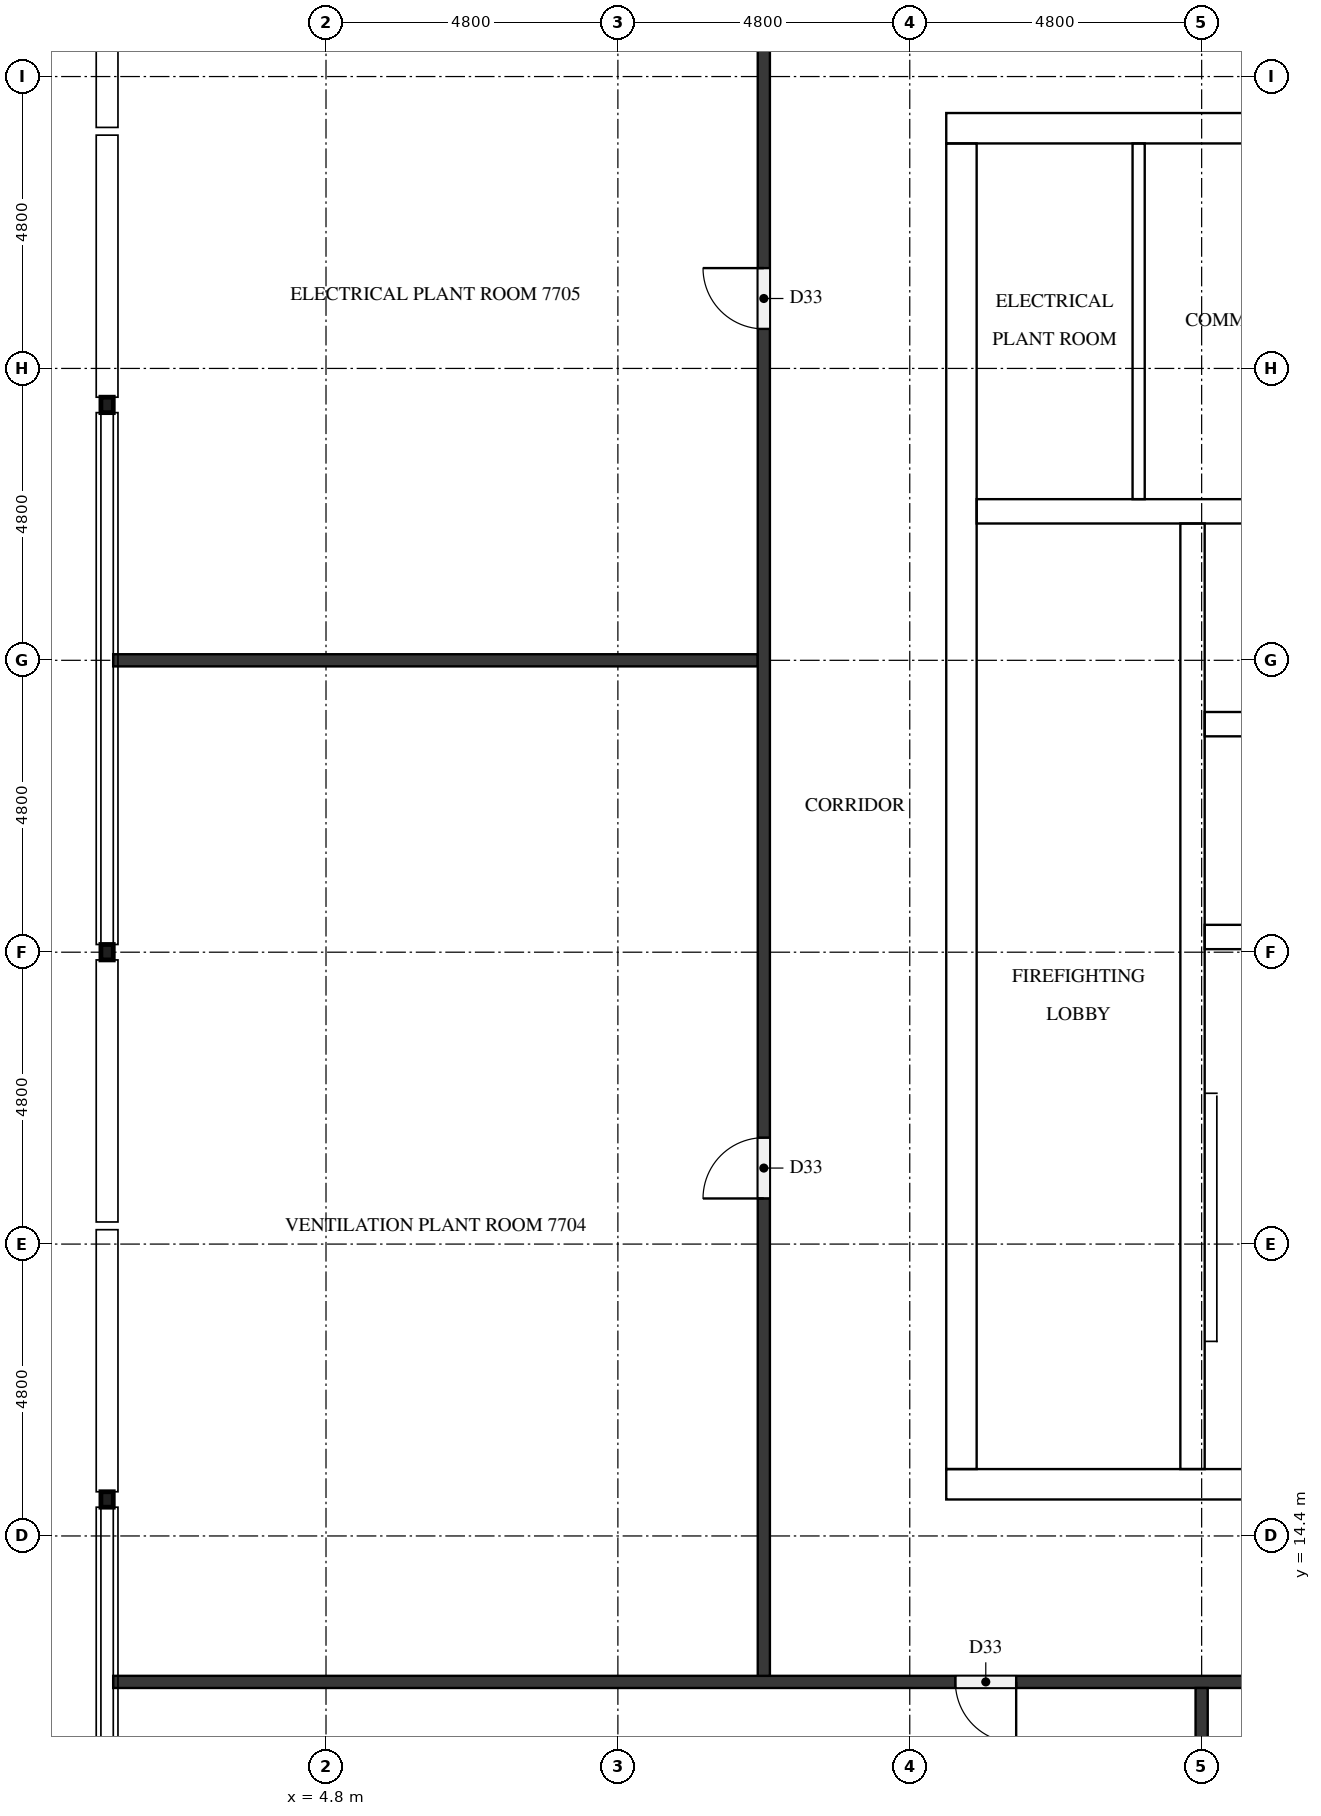
"""IFC4 building model, lengths in metres.
Left out: names, types, materials, properties, quantities, classifications, styles, units other than length and angle.
Written with IfcOpenShell. Run it as: python <this file> out.ifc"""

import sys

from ifc_helpers import new_model, si_unit, direction, frame, frame_2d, origin, origin_2d, place, context, subcontext, project, spatial, rectangle, hollow_rectangle, extrude, element, fill, save


model = new_model("IFC4")
c1 = context("Model", 3, precision=1e-05, world=origin(), true_north=direction((0.0, 1.0)))
c2 = subcontext(c1, "Body", "Model", "MODEL_VIEW")
j1 = project(units=[si_unit("LENGTHUNIT", "METRE"), si_unit("PLANEANGLEUNIT", "RADIAN")], contexts=[c1])
p1 = place(None, origin())
s1 = spatial("IfcSite", under=j1, at=p1, CompositionType="ELEMENT")
p2 = place(p1, origin())
s2 = spatial("IfcBuilding", under=s1, at=p2, CompositionType="ELEMENT")
p3 = place(p2, frame((0.0, 0.0, 296.3)))
s3 = spatial("IfcBuildingStorey", under=s2, at=p3, CompositionType="ELEMENT", Elevation=296.3)
p4 = place(p3, frame((15.0, 15.25, 0.0), z_axis=(0.0, 0.0, 1.0), x_axis=(1.0, 0.0, 0.0)))
e1 = element("IfcWall", 1, at=p4, inside=s3, PredefinedType="SHEAR", context=c2, shape_type="SweptSolid", body=[
    extrude(rectangle(XDim=32.4, YDim=0.5, at=frame_2d((16.2, 0.0))), origin(), (0.0, 0.0, 1.0), 4.4),
])
p5 = place(p4, frame((15.3, 0.0, 0.0)))
e2 = element("IfcOpeningElement", 2, at=p5, cuts=e1, PredefinedType="OPENING", context=c2, shape_type="SweptSolid", body=[
    extrude(rectangle(XDim=1.8, YDim=2.1, at=frame_2d((0.9, 1.05))), frame((0.0, 0.26, 0.0), z_axis=(0.0, -1.0, 0.0), x_axis=(1.0, 0.0, 0.0)), (0.0, 0.0, 1.0), 0.52),
])
p6 = place(p3, frame((15.0, 37.55, 0.0), z_axis=(0.0, 0.0, 1.0), x_axis=(1.0, 0.0, 0.0)))
e3 = element("IfcWall", 3, at=p6, inside=s3, PredefinedType="SHEAR", context=c2, shape_type="SweptSolid", body=[
    extrude(rectangle(XDim=32.4, YDim=0.5, at=frame_2d((16.2, 0.0))), origin(), (0.0, 0.0, 1.0), 4.4),
])
p7 = place(p6, frame((15.3, 0.0, 0.0)))
e4 = element("IfcOpeningElement", 4, at=p7, cuts=e3, PredefinedType="OPENING", context=c2, shape_type="SweptSolid", body=[
    extrude(rectangle(XDim=1.8, YDim=2.1, at=frame_2d((0.9, 1.05))), frame((0.0, 0.26, 0.0), z_axis=(0.0, -1.0, 0.0), x_axis=(1.0, 0.0, 0.0)), (0.0, 0.0, 1.0), 0.52),
])
p8 = place(p6, frame((1.282, 0.0, 0.0)))
e5 = element("IfcOpeningElement", 5, at=p8, cuts=e3, PredefinedType="OPENING", context=c2, shape_type="SweptSolid", body=[
    extrude(rectangle(XDim=1.0, YDim=2.1, at=frame_2d((0.5, 1.05))), frame((0.0, 0.26, 0.0), z_axis=(0.0, -1.0, 0.0), x_axis=(1.0, 0.0, 0.0)), (0.0, 0.0, 1.0), 0.52),
])
p9 = place(p6, frame((5.082, 0.0, 0.0)))
e6 = element("IfcOpeningElement", 6, at=p9, cuts=e3, PredefinedType="OPENING", context=c2, shape_type="SweptSolid", body=[
    extrude(rectangle(XDim=1.0, YDim=2.1, at=frame_2d((0.5, 1.05))), frame((0.0, 0.26, 0.0), z_axis=(0.0, -1.0, 0.0), x_axis=(1.0, 0.0, 0.0)), (0.0, 0.0, 1.0), 0.52),
])
p10 = place(p3, frame((15.25, 15.5, 0.0), z_axis=(0.0, 0.0, 1.0), x_axis=(0.0, 1.0, 0.0)))
e7 = element("IfcWall", 7, at=p10, inside=s3, PredefinedType="SHEAR", context=c2, shape_type="SweptSolid", body=[
    extrude(rectangle(XDim=21.8, YDim=0.5, at=frame_2d((10.9, 0.0))), origin(), (0.0, 0.0, 1.0), 4.4),
])
p11 = place(p10, frame((5.26, 0.0, 0.0)))
e8 = element("IfcOpeningElement", 8, at=p11, cuts=e7, PredefinedType="OPENING", context=c2, shape_type="SweptSolid", body=[
    extrude(rectangle(XDim=1.2, YDim=2.1, at=frame_2d((0.6, 1.05))), frame((0.0, 0.26, 0.0), z_axis=(0.0, -1.0, 0.0), x_axis=(1.0, 0.0, 0.0)), (0.0, 0.0, 1.0), 0.52),
])
p12 = place(p3, frame((19.05, 15.5, 0.0), z_axis=(0.0, 0.0, 1.0), x_axis=(0.0, 1.0, 0.0)))
e9 = element("IfcWall", 9, at=p12, inside=s3, PredefinedType="SHEAR", context=c2, shape_type="SweptSolid", body=[
    extrude(rectangle(XDim=15.55, YDim=0.4, at=frame_2d((7.775, 0.0))), origin(), (0.0, 0.0, 1.0), 4.4),
])
p13 = place(p12, frame((9.95, 0.0, 0.0)))
e10 = element("IfcOpeningElement", 10, at=p13, cuts=e9, PredefinedType="OPENING", context=c2, shape_type="SweptSolid", body=[
    extrude(rectangle(XDim=1.1, YDim=2.1, at=frame_2d((0.55, 1.05))), frame((0.0, 0.21, 0.0), z_axis=(0.0, -1.0, 0.0), x_axis=(1.0, 0.0, 0.0)), (0.0, 0.0, 1.0), 0.42),
])
p14 = place(p12, frame((13.45, 0.0, 0.0)))
e11 = element("IfcOpeningElement", 11, at=p14, cuts=e9, PredefinedType="OPENING", context=c2, shape_type="SweptSolid", body=[
    extrude(rectangle(XDim=1.1, YDim=2.1, at=frame_2d((0.55, 1.05))), frame((0.0, 0.21, 0.0), z_axis=(0.0, -1.0, 0.0), x_axis=(1.0, 0.0, 0.0)), (0.0, 0.0, 1.0), 0.42),
])
p15 = place(p12, frame((0.7, 0.0, 0.0)))
e12 = element("IfcOpeningElement", 12, at=p15, cuts=e9, PredefinedType="OPENING", context=c2, shape_type="SweptSolid", body=[
    extrude(rectangle(XDim=1.2, YDim=2.1, at=frame_2d((0.6, 1.05))), frame((0.0, 0.21, 0.0), z_axis=(0.0, -1.0, 0.0), x_axis=(1.0, 0.0, 0.0)), (0.0, 0.0, 1.0), 0.42),
])
for number, where, z_axis, x_axis in (
    (13, (19.25, 24.25, 0.0), (0.0, 0.0, 1.0), (1.0, 0.0, 0.0)),
    (14, (19.25, 27.75, 0.0), (0.0, 0.0, 1.0), (1.0, 0.0, 0.0)),
):
    element("IfcWall", number, at=place(p3, frame(where, z_axis=z_axis, x_axis=x_axis)), inside=s3, PredefinedType="SHEAR", context=c2, shape_type="SweptSolid", body=[
        extrude(rectangle(XDim=3.65, YDim=0.4, at=frame_2d((1.825, 0.0))), origin(), (0.0, 0.0, 1.0), 4.4),
    ])
p16 = place(p3, frame((15.5, 31.25, 0.0), z_axis=(0.0, 0.0, 1.0), x_axis=(1.0, 0.0, 0.0)))
e15 = element("IfcWall", 15, at=p16, inside=s3, PredefinedType="SHEAR", context=c2, shape_type="SweptSolid", body=[
    extrude(rectangle(XDim=7.4, YDim=0.4, at=frame_2d((3.7, 0.0))), origin(), (0.0, 0.0, 1.0), 4.4),
])
for number, where, z_axis, x_axis in (
    (16, (1.2, 33.0, 0.0), (0.0, 0.0, 1.0), (1.0, 0.0, 0.0)),
    (17, (1.2, 24.0, 0.0), (0.0, 0.0, 1.0), (1.0, 0.0, 0.0)),
    (18, (1.2, 15.0, 0.0), (0.0, 0.0, 1.0), (1.0, 0.0, 0.0)),
):
    element("IfcColumn", number, at=place(p3, frame(where, z_axis=z_axis, x_axis=x_axis)), inside=s3, PredefinedType="COLUMN", context=c2, shape_type="SweptSolid", body=[
        extrude(hollow_rectangle(XDim=0.203, YDim=0.254, WallThickness=0.01, InnerFilletRadius=0.004, OuterFilletRadius=0.013, at=origin_2d()), origin(), (0.0, 0.0, 1.0), 4.4),
    ])
p17 = place(p3, frame((18.164, 31.45, 0.0), z_axis=(0.0, 0.0, 1.0), x_axis=(0.0, 1.0, 0.0)))
e19 = element("IfcWall", 19, at=p17, inside=s3, PredefinedType="PARTITIONING", context=c2, shape_type="SweptSolid", body=[
    extrude(rectangle(XDim=5.85, YDim=0.2, at=frame_2d((2.925, 0.0))), origin(), (0.0, 0.0, 1.0), 4.4),
])
p18 = place(p3, frame((56.3, 12.0, 0.0), z_axis=(0.0, 0.0, 1.0), x_axis=(-1.0, 0.0, 0.0)))
e20 = element("IfcWall", 20, at=p18, inside=s3, PredefinedType="PARTITIONING", context=c2, shape_type="SweptSolid", body=[
    extrude(rectangle(XDim=55.0, YDim=0.2, at=frame_2d((27.5, 0.0))), origin(), (0.0, 0.0, 1.0), 4.4),
])
p19 = place(p18, frame((40.15, 0.0, 0.0)))
e21 = element("IfcOpeningElement", 21, at=p19, cuts=e20, PredefinedType="OPENING", context=c2, shape_type="SweptSolid", body=[
    extrude(rectangle(XDim=1.0, YDim=2.1, at=frame_2d((0.5, 1.05))), frame((0.0, 0.11, 0.0), z_axis=(0.0, -1.0, 0.0), x_axis=(1.0, 0.0, 0.0)), (0.0, 0.0, 1.0), 0.22),
])
p20 = place(p18, frame((26.95, 0.0, 0.0)))
e22 = element("IfcOpeningElement", 22, at=p20, cuts=e20, PredefinedType="OPENING", context=c2, shape_type="SweptSolid", body=[
    extrude(rectangle(XDim=1.0, YDim=2.1, at=frame_2d((0.5, 1.05))), frame((0.0, 0.11, 0.0), z_axis=(0.0, -1.0, 0.0), x_axis=(1.0, 0.0, 0.0)), (0.0, 0.0, 1.0), 0.22),
])
p21 = place(p18, frame((11.35, 0.0, 0.0)))
e23 = element("IfcOpeningElement", 23, at=p21, cuts=e20, PredefinedType="OPENING", context=c2, shape_type="SweptSolid", body=[
    extrude(rectangle(XDim=1.0, YDim=2.1, at=frame_2d((0.5, 1.05))), frame((0.0, 0.11, 0.0), z_axis=(0.0, -1.0, 0.0), x_axis=(1.0, 0.0, 0.0)), (0.0, 0.0, 1.0), 0.22),
])
p22 = place(p3, frame((1.3, 28.8, 0.0), z_axis=(0.0, 0.0, 1.0), x_axis=(1.0, 0.0, 0.0)))
e24 = element("IfcWall", 24, at=p22, inside=s3, PredefinedType="PARTITIONING", context=c2, shape_type="SweptSolid", body=[
    extrude(rectangle(XDim=10.6, YDim=0.2, at=frame_2d((5.3, 0.0))), origin(), (0.0, 0.0, 1.0), 4.4),
])
p23 = place(p3, frame((12.0, 12.1, 0.0), z_axis=(0.0, 0.0, 1.0), x_axis=(0.0, 1.0, 0.0)))
e25 = element("IfcWall", 25, at=p23, inside=s3, PredefinedType="PARTITIONING", context=c2, shape_type="SweptSolid", body=[
    extrude(rectangle(XDim=28.6, YDim=0.2, at=frame_2d((14.3, 0.0))), origin(), (0.0, 0.0, 1.0), 4.4),
])
p24 = place(p23, frame((7.85, 0.0, 0.0)))
e26 = element("IfcOpeningElement", 26, at=p24, cuts=e25, PredefinedType="OPENING", context=c2, shape_type="SweptSolid", body=[
    extrude(rectangle(XDim=1.0, YDim=2.1, at=frame_2d((0.5, 1.05))), frame((0.0, 0.11, 0.0), z_axis=(0.0, -1.0, 0.0), x_axis=(1.0, 0.0, 0.0)), (0.0, 0.0, 1.0), 0.22),
])
p25 = place(p23, frame((22.15, 0.0, 0.0)))
e27 = element("IfcOpeningElement", 27, at=p25, cuts=e25, PredefinedType="OPENING", context=c2, shape_type="SweptSolid", body=[
    extrude(rectangle(XDim=1.0, YDim=2.1, at=frame_2d((0.5, 1.05))), frame((0.0, 0.11, 0.0), z_axis=(0.0, -1.0, 0.0), x_axis=(1.0, 0.0, 0.0)), (0.0, 0.0, 1.0), 0.22),
])
p26 = place(p3, frame((19.2, 1.3, 0.0), z_axis=(0.0, 0.0, 1.0), x_axis=(0.0, 1.0, 0.0)))
e28 = element("IfcWall", 28, at=p26, inside=s3, PredefinedType="PARTITIONING", context=c2, shape_type="SweptSolid", body=[
    extrude(rectangle(XDim=10.6, YDim=0.2, at=frame_2d((5.3, 0.0))), origin(), (0.0, 0.0, 1.0), 4.4),
])
p27 = place(p13, origin())
e29 = element("IfcDoor", 29, at=p27, inside=s3, OperationType="DOUBLE_DOOR_SLIDING", PredefinedType="DOOR", context=c2, shape_type="SweptSolid", body=[
    extrude(rectangle(XDim=1.1, YDim=2.1, at=frame_2d((0.55, 1.05))), frame((0.0, 0.025, 0.0), z_axis=(0.0, -1.0, 0.0), x_axis=(1.0, 0.0, 0.0)), (0.0, 0.0, 1.0), 0.05),
])
fill(e10, e29)
p28 = place(p14, origin())
e30 = element("IfcDoor", 30, at=p28, inside=s3, OperationType="DOUBLE_DOOR_SLIDING", PredefinedType="DOOR", context=c2, shape_type="SweptSolid", body=[
    extrude(rectangle(XDim=1.1, YDim=2.1, at=frame_2d((0.55, 1.05))), frame((0.0, 0.025, 0.0), z_axis=(0.0, -1.0, 0.0), x_axis=(1.0, 0.0, 0.0)), (0.0, 0.0, 1.0), 0.05),
])
fill(e11, e30)
p29 = place(p15, frame((1.2, 0.0, 0.0), z_axis=(0.0, 0.0, 1.0), x_axis=(-1.0, 0.0, 0.0)))
e31 = element("IfcDoor", 31, at=p29, inside=s3, OperationType="SINGLE_SWING_LEFT", PredefinedType="DOOR", context=c2, shape_type="SweptSolid", body=[
    extrude(rectangle(XDim=1.2, YDim=2.1, at=frame_2d((0.6, 1.05))), frame((0.0, 0.025, 0.0), z_axis=(0.0, -1.0, 0.0), x_axis=(1.0, 0.0, 0.0)), (0.0, 0.0, 1.0), 0.05),
])
fill(e12, e31)
p30 = place(p11, frame((1.2, 0.0, 0.0), z_axis=(0.0, 0.0, 1.0), x_axis=(-1.0, 0.0, 0.0)))
e32 = element("IfcDoor", 32, at=p30, inside=s3, OperationType="SINGLE_SWING_RIGHT", PredefinedType="DOOR", context=c2, shape_type="SweptSolid", body=[
    extrude(rectangle(XDim=1.2, YDim=2.1, at=frame_2d((0.6, 1.05))), frame((0.0, 0.025, 0.0), z_axis=(0.0, -1.0, 0.0), x_axis=(1.0, 0.0, 0.0)), (0.0, 0.0, 1.0), 0.05),
])
fill(e8, e32)
p31 = place(p8, origin())
e33 = element("IfcDoor", 33, at=p31, inside=s3, OperationType="SINGLE_SWING_RIGHT", PredefinedType="DOOR", context=c2, shape_type="SweptSolid", body=[
    extrude(rectangle(XDim=1.0, YDim=2.1, at=frame_2d((0.5, 1.05))), frame((0.0, 0.025, 0.0), z_axis=(0.0, -1.0, 0.0), x_axis=(1.0, 0.0, 0.0)), (0.0, 0.0, 1.0), 0.05),
])
fill(e5, e33)
p32 = place(p19, origin())
e34 = element("IfcDoor", 34, at=p32, inside=s3, OperationType="SINGLE_SWING_LEFT", PredefinedType="DOOR", context=c2, shape_type="SweptSolid", body=[
    extrude(rectangle(XDim=1.0, YDim=2.1, at=frame_2d((0.5, 1.05))), frame((0.0, 0.025, 0.0), z_axis=(0.0, -1.0, 0.0), x_axis=(1.0, 0.0, 0.0)), (0.0, 0.0, 1.0), 0.05),
])
fill(e21, e34)
p33 = place(p24, origin())
e35 = element("IfcDoor", 35, at=p33, inside=s3, OperationType="SINGLE_SWING_LEFT", PredefinedType="DOOR", context=c2, shape_type="SweptSolid", body=[
    extrude(rectangle(XDim=1.0, YDim=2.1, at=frame_2d((0.5, 1.05))), frame((0.0, 0.025, 0.0), z_axis=(0.0, -1.0, 0.0), x_axis=(1.0, 0.0, 0.0)), (0.0, 0.0, 1.0), 0.05),
])
fill(e26, e35)
p34 = place(p25, origin())
e36 = element("IfcDoor", 36, at=p34, inside=s3, OperationType="SINGLE_SWING_RIGHT", PredefinedType="DOOR", context=c2, shape_type="SweptSolid", body=[
    extrude(rectangle(XDim=1.0, YDim=2.1, at=frame_2d((0.5, 1.05))), frame((0.0, 0.025, 0.0), z_axis=(0.0, -1.0, 0.0), x_axis=(1.0, 0.0, 0.0)), (0.0, 0.0, 1.0), 0.05),
])
fill(e27, e36)
save(model, sys.argv[1])
